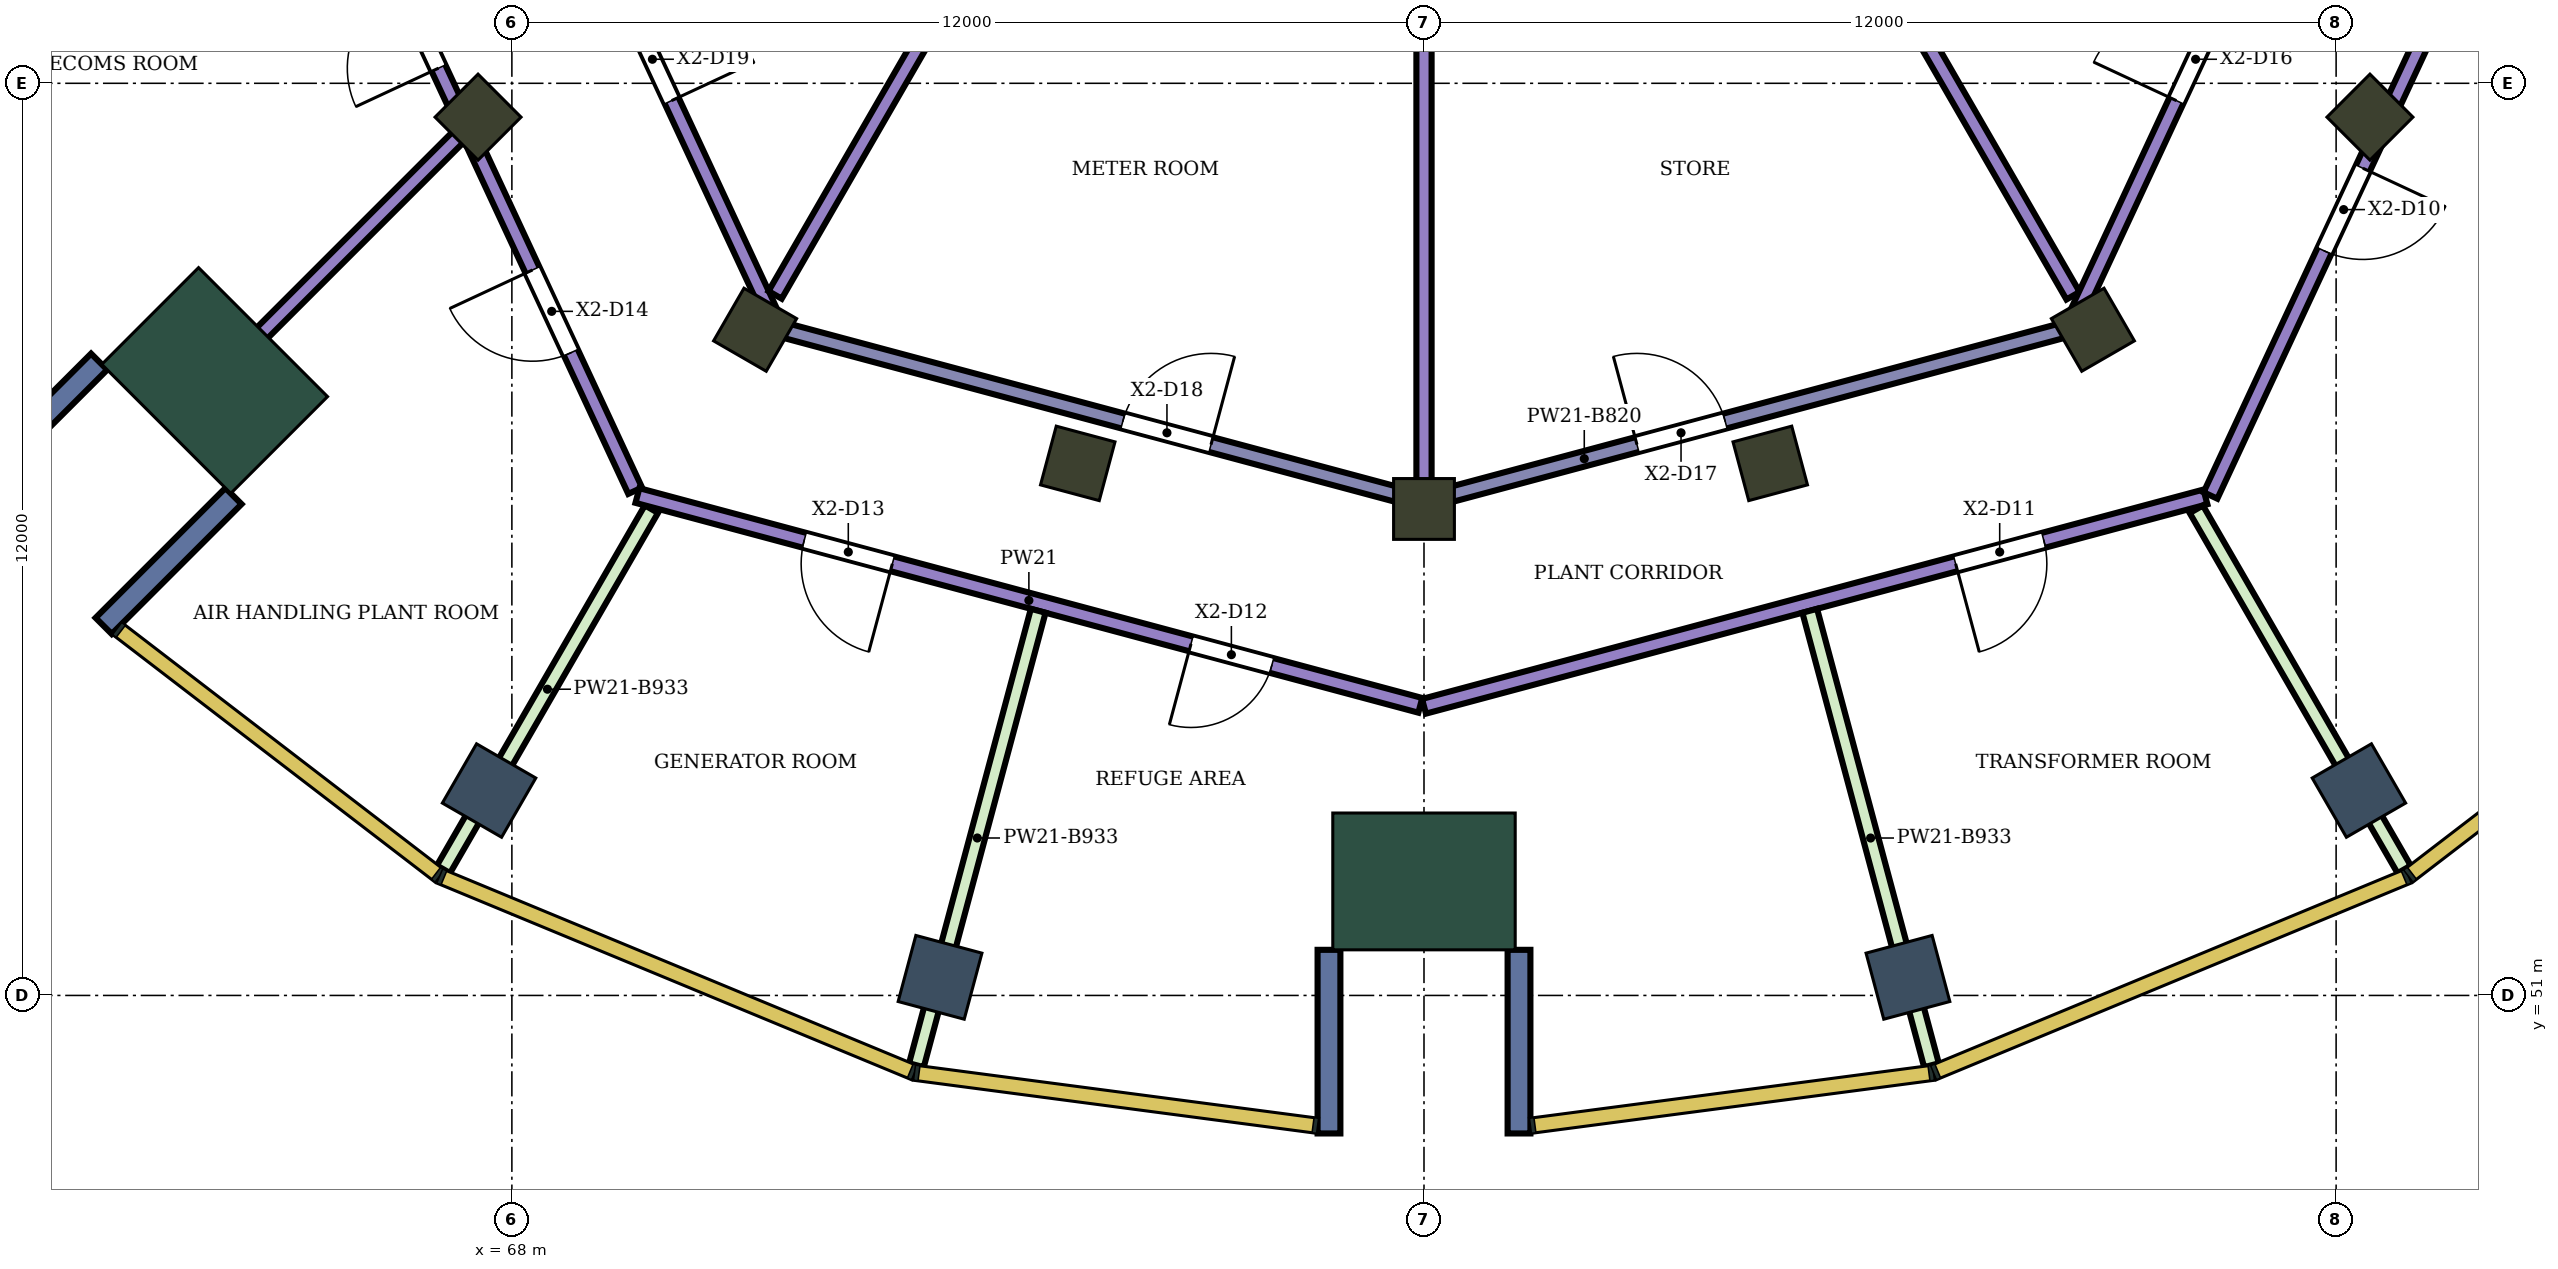
"""IFC4 building model, lengths in metres.
Left out: names, types, materials, properties, quantities, classifications, styles, units other than length and angle.
Written with IfcOpenShell. Run it as: python <this file> out.ifc"""

import sys

from ifc_helpers import new_model, si_unit, direction, frame, frame_2d, origin, origin_2d, place, context, subcontext, project, spatial, rectangle, extrude, element, fill, save


model = new_model("IFC4")
c1 = context("Model", 3, precision=1e-05, world=origin(), true_north=direction((0.0, 1.0)))
c2 = subcontext(c1, "Body", "Model", "MODEL_VIEW")
j1 = project(units=[si_unit("LENGTHUNIT", "METRE"), si_unit("PLANEANGLEUNIT", "RADIAN")], contexts=[c1])
p1 = place(None, origin())
s1 = spatial("IfcSite", under=j1, at=p1, CompositionType="ELEMENT")
p2 = place(p1, origin())
s2 = spatial("IfcBuilding", under=s1, at=p2, CompositionType="ELEMENT")
p3 = place(p2, frame((0.0, 0.0, 206.9)))
s3 = spatial("IfcBuildingStorey", under=s2, at=p3, CompositionType="ELEMENT", Elevation=206.9)
for number, where, z_axis, x_axis in (
    (1, (67.7, 53.696, 0.0), (0.0, 0.0, 1.0), (-0.5, -0.866, 0.0)),
    (2, (73.633, 51.238, 0.0), (0.0, 0.0, 1.0), (-0.259, -0.966, 0.0)),
    (3, (86.367, 51.238, 0.0), (0.0, 0.0, 1.0), (0.259, -0.966, 0.0)),
    (4, (92.3, 53.696, 0.0), (0.0, 0.0, 1.0), (0.5, -0.866, 0.0)),
):
    element("IfcColumn", number, at=place(p3, frame(where, z_axis=z_axis, x_axis=x_axis)), inside=s3, PredefinedType="COLUMN", context=c2, shape_type="SweptSolid", body=[
        extrude(rectangle(XDim=0.9, YDim=0.9, at=origin_2d()), origin(), (0.0, 0.0, 1.0), 5.6),
    ])
for number, where, z_axis, x_axis in (
    (5, (67.555, 62.555, 0.0), (0.0, 0.0, 1.0), (-0.707, -0.707, 0.0)),
    (6, (71.2, 59.758, 0.0), (0.0, 0.0, 1.0), (-0.5, -0.866, 0.0)),
    (7, (75.445, 58.0, 0.0), (0.0, 0.0, 1.0), (-0.259, -0.966, 0.0)),
    (8, (80.0, 57.4, 0.0), (0.0, 0.0, 1.0), (0.0, -1.0, 0.0)),
    (9, (84.555, 58.0, 0.0), (0.0, 0.0, 1.0), (0.259, -0.966, 0.0)),
    (10, (88.8, 59.758, 0.0), (0.0, 0.0, 1.0), (0.5, -0.866, 0.0)),
    (11, (92.445, 62.555, 0.0), (0.0, 0.0, 1.0), (0.707, -0.707, 0.0)),
):
    element("IfcColumn", number, at=place(p3, frame(where, z_axis=z_axis, x_axis=x_axis)), inside=s3, PredefinedType="COLUMN", context=c2, shape_type="SweptSolid", body=[
        extrude(rectangle(XDim=0.8, YDim=0.8, at=origin_2d()), origin(), (0.0, 0.0, 1.0), 5.6),
    ])
for number, where, z_axis, x_axis in (
    (12, (64.09, 59.09, 0.0), (0.0, 0.0, 1.0), (-0.707, -0.707, 0.0)),
    (13, (80.0, 52.5, 0.0), (0.0, 0.0, 1.0), (0.0, -1.0, 0.0)),
):
    element("IfcColumn", number, at=place(p3, frame(where, z_axis=z_axis, x_axis=x_axis)), inside=s3, PredefinedType="COLUMN", context=c2, shape_type="SweptSolid", body=[
        extrude(rectangle(XDim=1.8, YDim=2.4, at=origin_2d()), origin(), (0.0, 0.0, 1.0), 5.6),
    ])
for number, where, z_axis, x_axis in (
    (14, (62.57, 59.338, 0.0), (0.0, 0.0, 1.0), (-0.707, -0.707, 0.0)),
    (15, (64.338, 57.57, 0.0), (0.0, 0.0, 1.0), (-0.707, -0.707, 0.0)),
    (16, (78.75, 51.6, 0.0), (0.0, 0.0, 1.0), (0.0, -1.0, 0.0)),
    (17, (81.25, 51.6, 0.0), (0.0, 0.0, 1.0), (0.0, -1.0, 0.0)),
):
    element("IfcWall", number, at=place(p3, frame(where, z_axis=z_axis, x_axis=x_axis)), inside=s3, PredefinedType="NOTDEFINED", context=c2, shape_type="SweptSolid", body=[
        extrude(rectangle(XDim=2.416, YDim=0.3, at=frame_2d((1.208, 0.0))), origin(), (0.0, 0.0, 1.0), 5.6),
    ])
p4 = place(p3, frame((63.595, 58.596, 0.0), z_axis=(0.0, 0.0, 1.0), x_axis=(0.707106781187, 0.707106781187, 0.0)))
e18 = element("IfcWall", 18, at=p4, inside=s3, PredefinedType="PARTITIONING", context=c2, shape_type="SweptSolid", body=[
    extrude(rectangle(XDim=5.247, YDim=0.2, at=frame_2d((2.624, 0.0))), origin(), (0.0, 0.0, 1.0), 5.15),
])
p5 = place(p3, frame((66.15, 65.1, 0.0), z_axis=(0.0, 0.0, 1.0), x_axis=(0.421948011018, -0.906620028456, 0.0)))
e19 = element("IfcWall", 19, at=p5, inside=s3, PredefinedType="PARTITIONING", context=c2, shape_type="SweptSolid", body=[
    extrude(rectangle(XDim=8.228, YDim=0.2, at=frame_2d((4.114, 0.0))), origin(), (0.0, 0.0, 1.0), 5.15),
])
p6 = place(p5, frame((5.025, 0.0, 0.0)))
e20 = element("IfcOpeningElement", 20, at=p6, cuts=e19, PredefinedType="OPENING", context=c2, shape_type="SweptSolid", body=[
    extrude(rectangle(XDim=1.2, YDim=2.4, at=frame_2d((0.6, 1.2))), frame((0.0, 0.11, 0.0), z_axis=(0.0, -1.0, 0.0), x_axis=(1.0, 0.0, 0.0)), (0.0, 0.0, 1.0), 0.22),
])
p7 = place(p5, frame((0.897, 0.0, 0.0)))
e21 = element("IfcOpeningElement", 21, at=p7, cuts=e19, PredefinedType="OPENING", context=c2, shape_type="SweptSolid", body=[
    extrude(rectangle(XDim=1.2, YDim=2.4, at=frame_2d((0.6, 1.2))), frame((0.0, 0.11, 0.0), z_axis=(0.0, -1.0, 0.0), x_axis=(1.0, 0.0, 0.0)), (0.0, 0.0, 1.0), 0.22),
])
p8 = place(p3, frame((67.1, 52.659, 0.0), z_axis=(0.0, 0.0, 1.0), x_axis=(0.500021123982, 0.866013207504, 0.0)))
e22 = element("IfcWall", 22, at=p8, inside=s3, PredefinedType="PARTITIONING", context=c2, shape_type="SweptSolid", body=[
    extrude(rectangle(XDim=5.472, YDim=0.2, at=frame_2d((2.736, 0.0))), origin(), (0.0, 0.0, 1.0), 4.667),
])
p9 = place(p3, frame((68.32, 66.6, 0.0), z_axis=(0.0, 0.0, 1.0), x_axis=(0.422061116547, -0.90656737968, 0.0)))
e23 = element("IfcWall", 23, at=p9, inside=s3, PredefinedType="PARTITIONING", context=c2, shape_type="SweptSolid", body=[
    extrude(rectangle(XDim=7.46, YDim=0.2, at=frame_2d((3.73, 0.0))), origin(), (0.0, 0.0, 1.0), 5.15),
])
p10 = place(p9, frame((3.022, 0.0, 0.0)))
e24 = element("IfcOpeningElement", 24, at=p10, cuts=e23, PredefinedType="OPENING", context=c2, shape_type="SweptSolid", body=[
    extrude(rectangle(XDim=1.2, YDim=2.4, at=frame_2d((0.6, 1.2))), frame((0.0, 0.11, 0.0), z_axis=(0.0, -1.0, 0.0), x_axis=(1.0, 0.0, 0.0)), (0.0, 0.0, 1.0), 0.22),
])
p11 = place(p3, frame((69.652, 57.577, 0.0), z_axis=(0.0, 0.0, 1.0), x_axis=(0.965914220364, -0.25886235512, 0.0)))
e25 = element("IfcWall", 25, at=p11, inside=s3, PredefinedType="PARTITIONING", context=c2, shape_type="SweptSolid", body=[
    extrude(rectangle(XDim=10.663, YDim=0.2, at=frame_2d((5.332, 0.0))), origin(), (0.0, 0.0, 1.0), 5.15),
])
p12 = place(p11, frame((7.54, 0.0, 0.0)))
e26 = element("IfcOpeningElement", 26, at=p12, cuts=e25, PredefinedType="OPENING", context=c2, shape_type="SweptSolid", body=[
    extrude(rectangle(XDim=1.1, YDim=2.1, at=frame_2d((0.55, 1.05))), frame((0.0, 0.11, 0.0), z_axis=(0.0, -1.0, 0.0), x_axis=(1.0, 0.0, 0.0)), (0.0, 0.0, 1.0), 0.22),
])
p13 = place(p11, frame((2.272, 0.0, 0.0)))
e27 = element("IfcOpeningElement", 27, at=p13, cuts=e25, PredefinedType="OPENING", context=c2, shape_type="SweptSolid", body=[
    extrude(rectangle(XDim=1.2, YDim=2.4, at=frame_2d((0.6, 1.2))), frame((0.0, 0.11, 0.0), z_axis=(0.0, -1.0, 0.0), x_axis=(1.0, 0.0, 0.0)), (0.0, 0.0, 1.0), 0.22),
])
p14 = place(p3, frame((71.463, 60.216, 0.0), z_axis=(0.0, 0.0, 1.0), x_axis=(0.500032835289, 0.866006445491, 0.0)))
e28 = element("IfcWall", 28, at=p14, inside=s3, PredefinedType="PARTITIONING", context=c2, shape_type="SweptSolid", body=[
    extrude(rectangle(XDim=9.373, YDim=0.2, at=frame_2d((4.687, 0.0))), origin(), (0.0, 0.0, 1.0), 5.15),
])
p15 = place(p3, frame((71.498, 59.774, 0.0), z_axis=(0.0, 0.0, 1.0), x_axis=(0.965928196674, -0.258810198543, 0.0)))
e29 = element("IfcWall", 29, at=p15, inside=s3, PredefinedType="PARTITIONING", context=c2, shape_type="SweptSolid", body=[
    extrude(rectangle(XDim=8.672, YDim=0.2, at=frame_2d((4.336, 0.0))), origin(), (0.0, 0.0, 1.0), 4.78),
])
p16 = place(p15, frame((4.701, 0.0, 0.0)))
e30 = element("IfcOpeningElement", 30, at=p16, cuts=e29, PredefinedType="OPENING", context=c2, shape_type="SweptSolid", body=[
    extrude(rectangle(XDim=1.2, YDim=2.4, at=frame_2d((0.6, 1.2))), frame((0.0, 0.11, 0.0), z_axis=(0.0, -1.0, 0.0), x_axis=(1.0, 0.0, 0.0)), (0.0, 0.0, 1.0), 0.22),
])
p17 = place(p3, frame((73.322, 50.082, 0.0), z_axis=(0.0, 0.0, 1.0), x_axis=(0.258872782105, 0.965911425901, 0.0)))
e31 = element("IfcWall", 31, at=p17, inside=s3, PredefinedType="PARTITIONING", context=c2, shape_type="SweptSolid", body=[
    extrude(rectangle(XDim=6.189, YDim=0.2, at=frame_2d((3.095, 0.0))), origin(), (0.0, 0.0, 1.0), 4.667),
])
p18 = place(p3, frame((80.0, 54.804, 0.0), z_axis=(0.0, 0.0, 1.0), x_axis=(0.965920507456, 0.258838894444, 0.0)))
e32 = element("IfcWall", 32, at=p18, inside=s3, PredefinedType="PARTITIONING", context=c2, shape_type="SweptSolid", body=[
    extrude(rectangle(XDim=10.643, YDim=0.2, at=frame_2d((5.322, 0.0))), origin(), (0.0, 0.0, 1.0), 5.15),
])
p19 = place(p18, frame((7.241, 0.0, 0.0)))
e33 = element("IfcOpeningElement", 33, at=p19, cuts=e32, PredefinedType="OPENING", context=c2, shape_type="SweptSolid", body=[
    extrude(rectangle(XDim=1.2, YDim=2.4, at=frame_2d((0.6, 1.2))), frame((0.0, 0.11, 0.0), z_axis=(0.0, -1.0, 0.0), x_axis=(1.0, 0.0, 0.0)), (0.0, 0.0, 1.0), 0.22),
])
p20 = place(p3, frame((80.0, 57.626, 0.0), z_axis=(0.0, 0.0, 1.0), x_axis=(0.0, 1.0, 0.0)))
e34 = element("IfcWall", 34, at=p20, inside=s3, PredefinedType="PARTITIONING", context=c2, shape_type="SweptSolid", body=[
    extrude(rectangle(XDim=9.675, YDim=0.2, at=frame_2d((4.837, 0.0))), origin(), (0.0, 0.0, 1.0), 5.15),
])
p21 = place(p3, frame((80.0, 57.496, 0.0), z_axis=(0.0, 0.0, 1.0), x_axis=(0.965931702874, 0.258797112392, 0.0)))
e35 = element("IfcWall", 35, at=p21, inside=s3, PredefinedType="PARTITIONING", context=c2, shape_type="SweptSolid", body=[
    extrude(rectangle(XDim=8.732, YDim=0.2, at=frame_2d((4.366, 0.0))), origin(), (0.0, 0.0, 1.0), 4.78),
])
p22 = place(p21, frame((2.901, 0.0, 0.0)))
e36 = element("IfcOpeningElement", 36, at=p22, cuts=e35, PredefinedType="OPENING", context=c2, shape_type="SweptSolid", body=[
    extrude(rectangle(XDim=1.2, YDim=2.4, at=frame_2d((0.6, 1.2))), frame((0.0, 0.11, 0.0), z_axis=(0.0, -1.0, 0.0), x_axis=(1.0, 0.0, 0.0)), (0.0, 0.0, 1.0), 0.22),
])
p23 = place(p3, frame((83.848, 68.333, 0.0), z_axis=(0.0, 0.0, 1.0), x_axis=(0.499897383715, -0.866084641219, 0.0)))
e37 = element("IfcWall", 37, at=p23, inside=s3, PredefinedType="PARTITIONING", context=c2, shape_type="SweptSolid", body=[
    extrude(rectangle(XDim=9.383, YDim=0.2, at=frame_2d((4.692, 0.0))), origin(), (0.0, 0.0, 1.0), 5.15),
])
p24 = place(p3, frame((85.075, 56.06, 0.0), z_axis=(0.0, 0.0, 1.0), x_axis=(0.258789317819, -0.9659337912, 0.0)))
e38 = element("IfcWall", 38, at=p24, inside=s3, PredefinedType="PARTITIONING", context=c2, shape_type="SweptSolid", body=[
    extrude(rectangle(XDim=6.19, YDim=0.2, at=frame_2d((3.095, 0.0))), origin(), (0.0, 0.0, 1.0), 4.667),
])
p25 = place(p3, frame((88.502, 59.774, 0.0), z_axis=(0.0, 0.0, 1.0), x_axis=(0.422164659646, 0.906519167004, 0.0)))
e39 = element("IfcWall", 39, at=p25, inside=s3, PredefinedType="PARTITIONING", context=c2, shape_type="SweptSolid", body=[
    extrude(rectangle(XDim=7.53, YDim=0.2, at=frame_2d((3.765, 0.0))), origin(), (0.0, 0.0, 1.0), 5.15),
])
p26 = place(p25, frame((3.308, 0.0, 0.0)))
e40 = element("IfcOpeningElement", 40, at=p26, cuts=e39, PredefinedType="OPENING", context=c2, shape_type="SweptSolid", body=[
    extrude(rectangle(XDim=1.2, YDim=2.4, at=frame_2d((0.6, 1.2))), frame((0.0, 0.11, 0.0), z_axis=(0.0, -1.0, 0.0), x_axis=(1.0, 0.0, 0.0)), (0.0, 0.0, 1.0), 0.22),
])
p27 = place(p3, frame((90.161, 57.396, 0.0), z_axis=(0.0, 0.0, 1.0), x_axis=(0.499911747244, -0.866076350542, 0.0)))
e41 = element("IfcWall", 41, at=p27, inside=s3, PredefinedType="PARTITIONING", context=c2, shape_type="SweptSolid", body=[
    extrude(rectangle(XDim=5.471, YDim=0.2, at=frame_2d((2.735, 0.0))), origin(), (0.0, 0.0, 1.0), 4.667),
])
p28 = place(p3, frame((90.347, 57.577, 0.0), z_axis=(0.0, 0.0, 1.0), x_axis=(0.422271497137, 0.906469405278, 0.0)))
e42 = element("IfcWall", 42, at=p28, inside=s3, PredefinedType="PARTITIONING", context=c2, shape_type="SweptSolid", body=[
    extrude(rectangle(XDim=8.208, YDim=0.2, at=frame_2d((4.104, 0.0))), origin(), (0.0, 0.0, 1.0), 5.15),
])
p29 = place(p28, frame((3.549, 0.0, 0.0)))
e43 = element("IfcOpeningElement", 43, at=p29, cuts=e42, PredefinedType="OPENING", context=c2, shape_type="SweptSolid", body=[
    extrude(rectangle(XDim=1.2, YDim=2.4, at=frame_2d((0.6, 1.2))), frame((0.0, 0.11, 0.0), z_axis=(0.0, -1.0, 0.0), x_axis=(1.0, 0.0, 0.0)), (0.0, 0.0, 1.0), 0.22),
])
p30 = place(p29, frame((1.2, 0.0, 0.0), z_axis=(0.0, 0.0, 1.0), x_axis=(-1.0, 0.0, 0.0)))
e44 = element("IfcDoor", 44, at=p30, inside=s3, OperationType="SINGLE_SWING_LEFT", PredefinedType="DOOR", context=c2, shape_type="SweptSolid", body=[
    extrude(rectangle(XDim=1.2, YDim=2.4, at=frame_2d((0.6, 1.2))), frame((0.0, 0.025, 0.0), z_axis=(0.0, -1.0, 0.0), x_axis=(1.0, 0.0, 0.0)), (0.0, 0.0, 1.0), 0.05),
])
fill(e43, e44)
p31 = place(p19, frame((1.2, 0.0, 0.0), z_axis=(0.0, 0.0, 1.0), x_axis=(-1.0, 0.0, 0.0)))
e45 = element("IfcDoor", 45, at=p31, inside=s3, OperationType="SINGLE_SWING_RIGHT", PredefinedType="DOOR", context=c2, shape_type="SweptSolid", body=[
    extrude(rectangle(XDim=1.2, YDim=2.4, at=frame_2d((0.6, 1.2))), frame((0.0, 0.025, 0.0), z_axis=(0.0, -1.0, 0.0), x_axis=(1.0, 0.0, 0.0)), (0.0, 0.0, 1.0), 0.05),
])
fill(e33, e45)
p32 = place(p12, frame((1.1, 0.0, 0.0), z_axis=(0.0, 0.0, 1.0), x_axis=(-1.0, 0.0, 0.0)))
e46 = element("IfcDoor", 46, at=p32, inside=s3, OperationType="SINGLE_SWING_RIGHT", PredefinedType="DOOR", context=c2, shape_type="SweptSolid", body=[
    extrude(rectangle(XDim=1.1, YDim=2.1, at=frame_2d((0.55, 1.05))), frame((0.0, 0.025, 0.0), z_axis=(0.0, -1.0, 0.0), x_axis=(1.0, 0.0, 0.0)), (0.0, 0.0, 1.0), 0.05),
])
fill(e26, e46)
p33 = place(p13, frame((1.2, 0.0, 0.0), z_axis=(0.0, 0.0, 1.0), x_axis=(-1.0, 0.0, 0.0)))
e47 = element("IfcDoor", 47, at=p33, inside=s3, OperationType="SINGLE_SWING_LEFT", PredefinedType="DOOR", context=c2, shape_type="SweptSolid", body=[
    extrude(rectangle(XDim=1.2, YDim=2.4, at=frame_2d((0.6, 1.2))), frame((0.0, 0.025, 0.0), z_axis=(0.0, -1.0, 0.0), x_axis=(1.0, 0.0, 0.0)), (0.0, 0.0, 1.0), 0.05),
])
fill(e27, e47)
p34 = place(p6, frame((1.2, 0.0, 0.0), z_axis=(0.0, 0.0, 1.0), x_axis=(-1.0, 0.0, 0.0)))
e48 = element("IfcDoor", 48, at=p34, inside=s3, OperationType="SINGLE_SWING_RIGHT", PredefinedType="DOOR", context=c2, shape_type="SweptSolid", body=[
    extrude(rectangle(XDim=1.2, YDim=2.4, at=frame_2d((0.6, 1.2))), frame((0.0, 0.025, 0.0), z_axis=(0.0, -1.0, 0.0), x_axis=(1.0, 0.0, 0.0)), (0.0, 0.0, 1.0), 0.05),
])
fill(e20, e48)
p35 = place(p7, frame((1.2, 0.0, 0.0), z_axis=(0.0, 0.0, 1.0), x_axis=(-1.0, 0.0, 0.0)))
e49 = element("IfcDoor", 49, at=p35, inside=s3, OperationType="SINGLE_SWING_LEFT", PredefinedType="DOOR", context=c2, shape_type="SweptSolid", body=[
    extrude(rectangle(XDim=1.2, YDim=2.4, at=frame_2d((0.6, 1.2))), frame((0.0, 0.025, 0.0), z_axis=(0.0, -1.0, 0.0), x_axis=(1.0, 0.0, 0.0)), (0.0, 0.0, 1.0), 0.05),
])
fill(e21, e49)
p36 = place(p26, origin())
e50 = element("IfcDoor", 50, at=p36, inside=s3, OperationType="SINGLE_SWING_LEFT", PredefinedType="DOOR", context=c2, shape_type="SweptSolid", body=[
    extrude(rectangle(XDim=1.2, YDim=2.4, at=frame_2d((0.6, 1.2))), frame((0.0, 0.025, 0.0), z_axis=(0.0, -1.0, 0.0), x_axis=(1.0, 0.0, 0.0)), (0.0, 0.0, 1.0), 0.05),
])
fill(e40, e50)
p37 = place(p22, origin())
e51 = element("IfcDoor", 51, at=p37, inside=s3, OperationType="SINGLE_SWING_LEFT", PredefinedType="DOOR", context=c2, shape_type="SweptSolid", body=[
    extrude(rectangle(XDim=1.2, YDim=2.4, at=frame_2d((0.6, 1.2))), frame((0.0, 0.025, 0.0), z_axis=(0.0, -1.0, 0.0), x_axis=(1.0, 0.0, 0.0)), (0.0, 0.0, 1.0), 0.05),
])
fill(e36, e51)
p38 = place(p16, origin())
e52 = element("IfcDoor", 52, at=p38, inside=s3, OperationType="SINGLE_SWING_RIGHT", PredefinedType="DOOR", context=c2, shape_type="SweptSolid", body=[
    extrude(rectangle(XDim=1.2, YDim=2.4, at=frame_2d((0.6, 1.2))), frame((0.0, 0.025, 0.0), z_axis=(0.0, -1.0, 0.0), x_axis=(1.0, 0.0, 0.0)), (0.0, 0.0, 1.0), 0.05),
])
fill(e30, e52)
p39 = place(p10, origin())
e53 = element("IfcDoor", 53, at=p39, inside=s3, OperationType="SINGLE_SWING_RIGHT", PredefinedType="DOOR", context=c2, shape_type="SweptSolid", body=[
    extrude(rectangle(XDim=1.2, YDim=2.4, at=frame_2d((0.6, 1.2))), frame((0.0, 0.025, 0.0), z_axis=(0.0, -1.0, 0.0), x_axis=(1.0, 0.0, 0.0)), (0.0, 0.0, 1.0), 0.05),
])
fill(e24, e53)
save(model, sys.argv[1])
